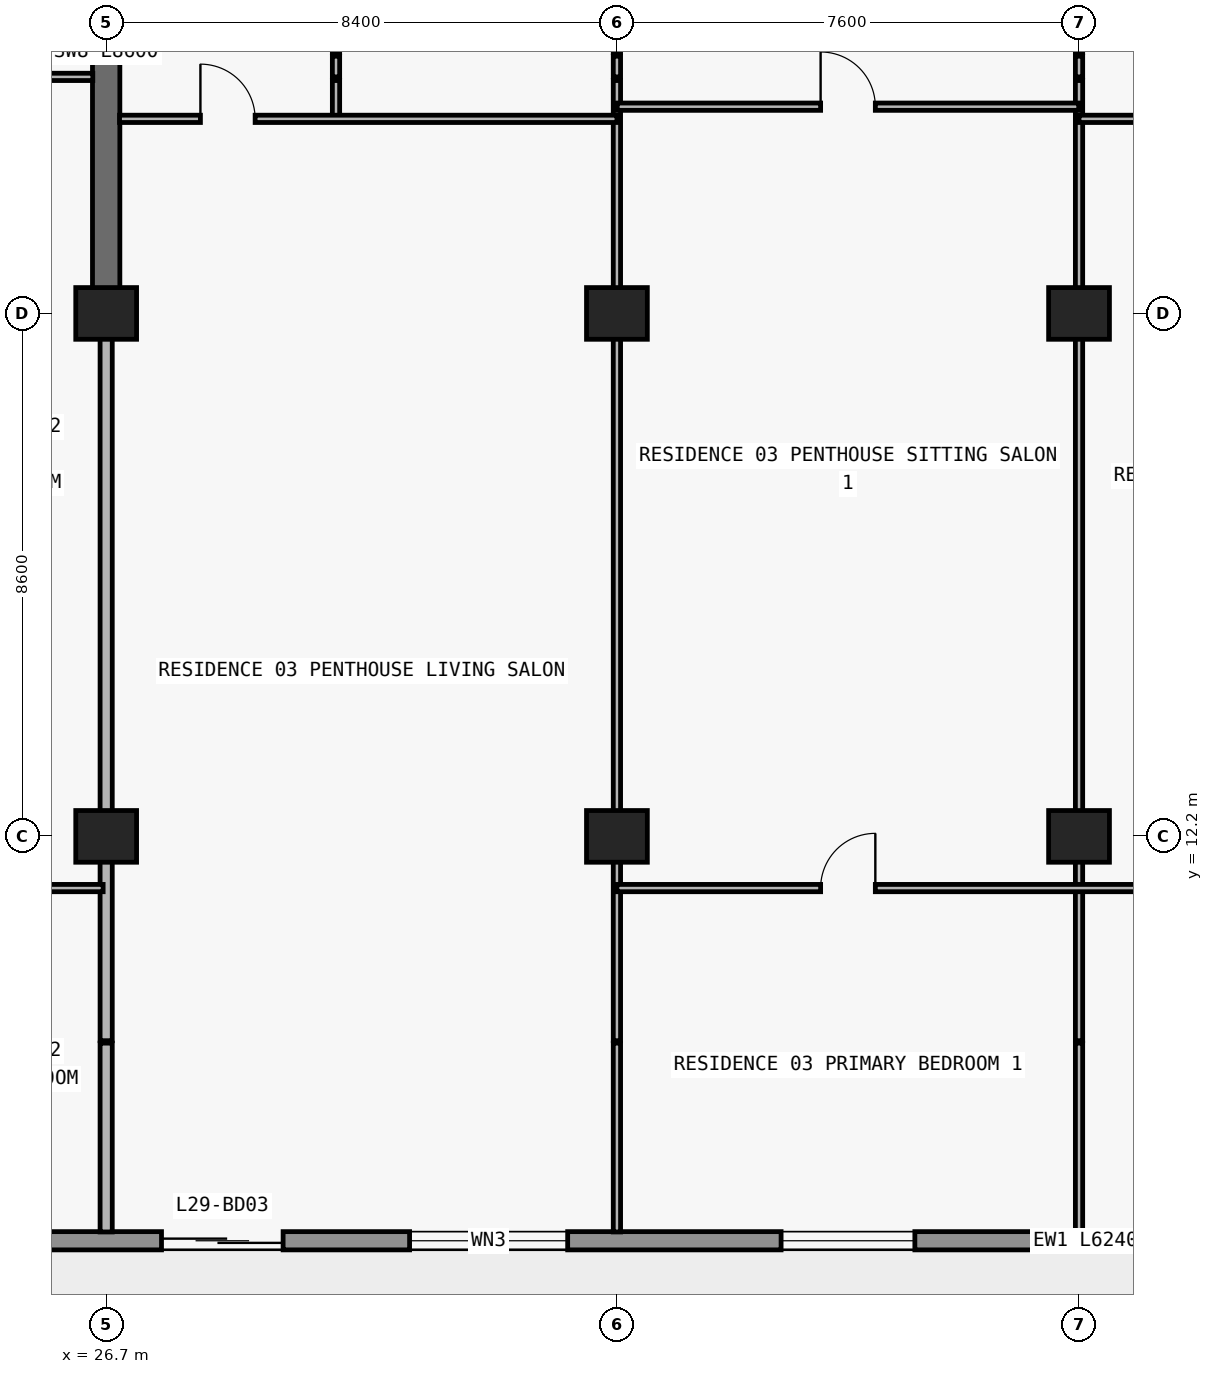
"""IFC4 building model, lengths in metres.
Left out: names, types, materials, properties, quantities, classifications, styles, units other than length and angle.
Written with IfcOpenShell. Run it as: python <this file> out.ifc"""

import sys

from ifc_helpers import new_model, si_unit, direction, frame, frame_2d, origin, origin_2d, place, context, subcontext, project, spatial, rectangle, extrude, element, fill, save


model = new_model("IFC4")
c1 = context("Model", 3, precision=1e-05, world=origin(), true_north=direction((0.0, 1.0)))
c2 = subcontext(c1, "Body", "Model", "MODEL_VIEW")
j1 = project(units=[si_unit("LENGTHUNIT", "METRE"), si_unit("PLANEANGLEUNIT", "RADIAN")], contexts=[c1])
p1 = place(None, origin())
s1 = spatial("IfcSite", under=j1, at=p1, CompositionType="ELEMENT")
p2 = place(p1, origin())
s2 = spatial("IfcBuilding", under=s1, at=p2, CompositionType="ELEMENT")
p3 = place(p2, frame((0.0, 0.0, 109.2)))
s3 = spatial("IfcBuildingStorey", under=s2, at=p3, CompositionType="ELEMENT", Elevation=109.2)
for number, where, z_axis, x_axis in (
    (1, (26.7, 12.2, 0.0), (0.0, 0.0, 1.0), (1.0, 0.0, 0.0)),
    (2, (35.1, 12.2, 0.0), (0.0, 0.0, 1.0), (1.0, 0.0, 0.0)),
    (3, (42.7, 12.2, 0.0), (0.0, 0.0, 1.0), (1.0, 0.0, 0.0)),
    (4, (26.7, 20.8, 0.0), (0.0, 0.0, 1.0), (1.0, 0.0, 0.0)),
    (5, (35.1, 20.8, 0.0), (0.0, 0.0, 1.0), (1.0, 0.0, 0.0)),
    (6, (42.7, 20.8, 0.0), (0.0, 0.0, 1.0), (1.0, 0.0, 0.0)),
):
    element("IfcColumn", number, at=place(p3, frame(where, z_axis=z_axis, x_axis=x_axis)), inside=s3, PredefinedType="COLUMN", context=c2, shape_type="SweptSolid", body=[
        extrude(rectangle(XDim=1.0, YDim=0.85, at=origin_2d()), origin(), (0.0, 0.0, 1.0), 3.05),
    ])
p4 = place(p3, frame((26.7, 20.8, 0.0), z_axis=(0.0, 0.0, 1.0), x_axis=(0.0, 1.0, 0.0)))
e7 = element("IfcWall", 7, at=p4, inside=s3, PredefinedType="SHEAR", context=c2, shape_type="SweptSolid", body=[
    extrude(rectangle(XDim=8.6, YDim=0.45, at=frame_2d((4.3, 0.0))), origin(), (0.0, 0.0, 1.0), 3.05),
])
p5 = place(p3, frame((70.1, 5.55, 0.0), z_axis=(0.0, 0.0, 1.0), x_axis=(-1.0, 0.0, 0.0)))
e8 = element("IfcWall", 8, at=p5, inside=s3, PredefinedType="STANDARD", context=c2, shape_type="SweptSolid", body=[
    extrude(rectangle(XDim=62.4, YDim=0.3, at=frame_2d((31.2, 0.0))), origin(), (0.0, 0.0, 1.0), 3.05),
])
p6 = place(p5, frame((57.226, 0.0, 0.0)))
e9 = element("IfcOpeningElement", 9, at=p6, cuts=e8, PredefinedType="OPENING", context=c2, shape_type="SweptSolid", body=[
    extrude(rectangle(XDim=2.0, YDim=2.3, at=frame_2d((1.0, 1.15))), frame((0.0, 0.16, 0.0), z_axis=(0.0, -1.0, 0.0), x_axis=(1.0, 0.0, 0.0)), (0.0, 0.0, 1.0), 0.32),
])
p7 = place(p5, frame((52.926, 0.0, 0.85)))
e10 = element("IfcOpeningElement", 10, at=p7, cuts=e8, PredefinedType="OPENING", context=c2, shape_type="SweptSolid", body=[
    extrude(rectangle(XDim=2.2, YDim=1.55, at=frame_2d((1.1, 0.775))), frame((0.0, 0.16, 0.0), z_axis=(0.0, -1.0, 0.0), x_axis=(1.0, 0.0, 0.0)), (0.0, 0.0, 1.0), 0.32),
])
p8 = place(p5, frame((48.49, 0.0, 0.0)))
e11 = element("IfcOpeningElement", 11, at=p8, cuts=e8, PredefinedType="OPENING", context=c2, shape_type="SweptSolid", body=[
    extrude(rectangle(XDim=2.0, YDim=2.3, at=frame_2d((1.0, 1.15))), frame((0.0, 0.16, 0.0), z_axis=(0.0, -1.0, 0.0), x_axis=(1.0, 0.0, 0.0)), (0.0, 0.0, 1.0), 0.32),
])
p9 = place(p5, frame((44.39, 0.0, 0.85)))
e12 = element("IfcOpeningElement", 12, at=p9, cuts=e8, PredefinedType="OPENING", context=c2, shape_type="SweptSolid", body=[
    extrude(rectangle(XDim=1.8, YDim=1.55, at=frame_2d((0.9, 0.775))), frame((0.0, 0.16, 0.0), z_axis=(0.0, -1.0, 0.0), x_axis=(1.0, 0.0, 0.0)), (0.0, 0.0, 1.0), 0.32),
])
p10 = place(p5, frame((40.49, 0.0, 0.0)))
e13 = element("IfcOpeningElement", 13, at=p10, cuts=e8, PredefinedType="OPENING", context=c2, shape_type="SweptSolid", body=[
    extrude(rectangle(XDim=2.0, YDim=2.3, at=frame_2d((1.0, 1.15))), frame((0.0, 0.16, 0.0), z_axis=(0.0, -1.0, 0.0), x_axis=(1.0, 0.0, 0.0)), (0.0, 0.0, 1.0), 0.32),
])
p11 = place(p5, frame((35.81, 0.0, 0.65)))
e14 = element("IfcOpeningElement", 14, at=p11, cuts=e8, PredefinedType="OPENING", context=c2, shape_type="SweptSolid", body=[
    extrude(rectangle(XDim=2.6, YDim=1.85, at=frame_2d((1.3, 0.925))), frame((0.0, 0.16, 0.0), z_axis=(0.0, -1.0, 0.0), x_axis=(1.0, 0.0, 0.0)), (0.0, 0.0, 1.0), 0.32),
])
p12 = place(p5, frame((30.1, 0.0, 0.85)))
e15 = element("IfcOpeningElement", 15, at=p12, cuts=e8, PredefinedType="OPENING", context=c2, shape_type="SweptSolid", body=[
    extrude(rectangle(XDim=2.2, YDim=1.55, at=frame_2d((1.1, 0.775))), frame((0.0, 0.16, 0.0), z_axis=(0.0, -1.0, 0.0), x_axis=(1.0, 0.0, 0.0)), (0.0, 0.0, 1.0), 0.32),
])
p13 = place(p5, frame((22.1, 0.0, 0.85)))
e16 = element("IfcOpeningElement", 16, at=p13, cuts=e8, PredefinedType="OPENING", context=c2, shape_type="SweptSolid", body=[
    extrude(rectangle(XDim=2.2, YDim=1.55, at=frame_2d((1.1, 0.775))), frame((0.0, 0.16, 0.0), z_axis=(0.0, -1.0, 0.0), x_axis=(1.0, 0.0, 0.0)), (0.0, 0.0, 1.0), 0.32),
])
p14 = place(p5, frame((15.69, 0.0, 0.0)))
e17 = element("IfcOpeningElement", 17, at=p14, cuts=e8, PredefinedType="OPENING", context=c2, shape_type="SweptSolid", body=[
    extrude(rectangle(XDim=2.0, YDim=2.3, at=frame_2d((1.0, 1.15))), frame((0.0, 0.16, 0.0), z_axis=(0.0, -1.0, 0.0), x_axis=(1.0, 0.0, 0.0)), (0.0, 0.0, 1.0), 0.32),
])
p15 = place(p5, frame((11.59, 0.0, 0.85)))
e18 = element("IfcOpeningElement", 18, at=p15, cuts=e8, PredefinedType="OPENING", context=c2, shape_type="SweptSolid", body=[
    extrude(rectangle(XDim=1.8, YDim=1.55, at=frame_2d((0.9, 0.775))), frame((0.0, 0.16, 0.0), z_axis=(0.0, -1.0, 0.0), x_axis=(1.0, 0.0, 0.0)), (0.0, 0.0, 1.0), 0.32),
])
p16 = place(p5, frame((7.626, 0.0, 0.0)))
e19 = element("IfcOpeningElement", 19, at=p16, cuts=e8, PredefinedType="OPENING", context=c2, shape_type="SweptSolid", body=[
    extrude(rectangle(XDim=2.0, YDim=2.3, at=frame_2d((1.0, 1.15))), frame((0.0, 0.16, 0.0), z_axis=(0.0, -1.0, 0.0), x_axis=(1.0, 0.0, 0.0)), (0.0, 0.0, 1.0), 0.32),
])
p17 = place(p5, frame((3.326, 0.0, 0.85)))
e20 = element("IfcOpeningElement", 20, at=p17, cuts=e8, PredefinedType="OPENING", context=c2, shape_type="SweptSolid", body=[
    extrude(rectangle(XDim=2.2, YDim=1.55, at=frame_2d((1.1, 0.775))), frame((0.0, 0.16, 0.0), z_axis=(0.0, -1.0, 0.0), x_axis=(1.0, 0.0, 0.0)), (0.0, 0.0, 1.0), 0.32),
])
p18 = place(p3, frame((26.7, 5.695, 0.0), z_axis=(0.0, 0.0, 1.0), x_axis=(0.0, 1.0, 0.0)))
e21 = element("IfcWall", 21, at=p18, inside=s3, PredefinedType="PARTITIONING", context=c2, shape_type="SweptSolid", body=[
    extrude(rectangle(XDim=3.105, YDim=0.2, at=frame_2d((1.552, 0.0))), origin(), (0.0, 0.0, 1.0), 3.05),
])
p19 = place(p3, frame((26.7, 8.84, 0.0), z_axis=(0.0, 0.0, 1.0), x_axis=(0.0, 1.0, 0.0)))
e22 = element("IfcWall", 22, at=p19, inside=s3, PredefinedType="PARTITIONING", context=c2, shape_type="SweptSolid", body=[
    extrude(rectangle(XDim=11.955, YDim=0.2, at=frame_2d((5.978, 0.0))), origin(), (0.0, 0.0, 1.0), 2.174),
])
p20 = place(p3, frame((30.48, 24.0, 0.0), z_axis=(0.0, 0.0, 1.0), x_axis=(0.0, 1.0, 0.0)))
e23 = element("IfcWall", 23, at=p20, inside=s3, PredefinedType="PARTITIONING", context=c2, shape_type="SweptSolid", body=[
    extrude(rectangle(XDim=0.63, YDim=0.12, at=frame_2d((0.315, 0.0))), origin(), (0.0, 0.0, 1.0), 3.05),
])
p21 = place(p3, frame((30.48, 24.69, 0.0), z_axis=(0.0, 0.0, 1.0), x_axis=(0.0, 1.0, 0.0)))
e24 = element("IfcWall", 24, at=p21, inside=s3, PredefinedType="PARTITIONING", context=c2, shape_type="SweptSolid", body=[
    extrude(rectangle(XDim=0.34, YDim=0.12, at=frame_2d((0.17, 0.0))), origin(), (0.0, 0.0, 1.0), 3.05),
])
p22 = place(p3, frame((35.1, 5.695, 0.0), z_axis=(0.0, 0.0, 1.0), x_axis=(0.0, 1.0, 0.0)))
e25 = element("IfcWall", 25, at=p22, inside=s3, PredefinedType="PARTITIONING", context=c2, shape_type="SweptSolid", body=[
    extrude(rectangle(XDim=3.105, YDim=0.12, at=frame_2d((1.552, 0.0))), origin(), (0.0, 0.0, 1.0), 3.05),
])
p23 = place(p3, frame((35.1, 8.84, 0.0), z_axis=(0.0, 0.0, 1.0), x_axis=(0.0, 1.0, 0.0)))
e26 = element("IfcWall", 26, at=p23, inside=s3, PredefinedType="PARTITIONING", context=c2, shape_type="SweptSolid", body=[
    extrude(rectangle(XDim=15.79, YDim=0.12, at=frame_2d((7.895, 0.0))), origin(), (0.0, 0.0, 1.0), 2.174),
])
p24 = place(p3, frame((35.1, 24.69, 0.0), z_axis=(0.0, 0.0, 1.0), x_axis=(0.0, 1.0, 0.0)))
e27 = element("IfcWall", 27, at=p24, inside=s3, PredefinedType="PARTITIONING", context=c2, shape_type="SweptSolid", body=[
    extrude(rectangle(XDim=0.34, YDim=0.12, at=frame_2d((0.17, 0.0))), origin(), (0.0, 0.0, 1.0), 2.174),
])
p25 = place(p3, frame((42.7, 5.695, 0.0), z_axis=(0.0, 0.0, 1.0), x_axis=(0.0, 1.0, 0.0)))
e28 = element("IfcWall", 28, at=p25, inside=s3, PredefinedType="PARTITIONING", context=c2, shape_type="SweptSolid", body=[
    extrude(rectangle(XDim=3.105, YDim=0.12, at=frame_2d((1.552, 0.0))), origin(), (0.0, 0.0, 1.0), 3.05),
])
p26 = place(p3, frame((42.7, 8.84, 0.0), z_axis=(0.0, 0.0, 1.0), x_axis=(0.0, 1.0, 0.0)))
e29 = element("IfcWall", 29, at=p26, inside=s3, PredefinedType="PARTITIONING", context=c2, shape_type="SweptSolid", body=[
    extrude(rectangle(XDim=15.79, YDim=0.12, at=frame_2d((7.895, 0.0))), origin(), (0.0, 0.0, 1.0), 2.174),
])
p27 = place(p3, frame((42.7, 24.69, 0.0), z_axis=(0.0, 0.0, 1.0), x_axis=(0.0, 1.0, 0.0)))
e30 = element("IfcWall", 30, at=p27, inside=s3, PredefinedType="PARTITIONING", context=c2, shape_type="SweptSolid", body=[
    extrude(rectangle(XDim=0.34, YDim=0.12, at=frame_2d((0.17, 0.0))), origin(), (0.0, 0.0, 1.0), 2.174),
])
p28 = place(p3, frame((22.92, 11.35, 0.0), z_axis=(0.0, 0.0, 1.0), x_axis=(1.0, 0.0, 0.0)))
e31 = element("IfcWall", 31, at=p28, inside=s3, PredefinedType="PARTITIONING", context=c2, shape_type="SweptSolid", body=[
    extrude(rectangle(XDim=3.73, YDim=0.12, at=frame_2d((1.865, 0.0))), origin(), (0.0, 0.0, 1.0), 3.05),
])
p29 = place(p28, frame((1.415, 0.0, 0.0)))
e32 = element("IfcOpeningElement", 32, at=p29, cuts=e31, PredefinedType="OPENING", context=c2, shape_type="SweptSolid", body=[
    extrude(rectangle(XDim=0.9, YDim=2.15, at=frame_2d((0.45, 1.075))), frame((0.0, 0.07, 0.0), z_axis=(0.0, -1.0, 0.0), x_axis=(1.0, 0.0, 0.0)), (0.0, 0.0, 1.0), 0.14),
])
p30 = place(p3, frame((35.1, 11.35, 0.0), z_axis=(0.0, 0.0, 1.0), x_axis=(1.0, 0.0, 0.0)))
e33 = element("IfcWall", 33, at=p30, inside=s3, PredefinedType="PARTITIONING", context=c2, shape_type="SweptSolid", body=[
    extrude(rectangle(XDim=16.0, YDim=0.12, at=frame_2d((8.0, 0.0))), origin(), (0.0, 0.0, 1.0), 3.05),
])
p31 = place(p30, frame((3.35, 0.0, 0.0)))
e34 = element("IfcOpeningElement", 34, at=p31, cuts=e33, PredefinedType="OPENING", context=c2, shape_type="SweptSolid", body=[
    extrude(rectangle(XDim=0.9, YDim=2.15, at=frame_2d((0.45, 1.075))), frame((0.0, 0.07, 0.0), z_axis=(0.0, -1.0, 0.0), x_axis=(1.0, 0.0, 0.0)), (0.0, 0.0, 1.0), 0.14),
])
p32 = place(p30, frame((11.35, 0.0, 0.0)))
e35 = element("IfcOpeningElement", 35, at=p32, cuts=e33, PredefinedType="OPENING", context=c2, shape_type="SweptSolid", body=[
    extrude(rectangle(XDim=0.9, YDim=2.15, at=frame_2d((0.45, 1.075))), frame((0.0, 0.07, 0.0), z_axis=(0.0, -1.0, 0.0), x_axis=(1.0, 0.0, 0.0)), (0.0, 0.0, 1.0), 0.14),
])
p33 = place(p3, frame((26.92, 24.0, 0.0), z_axis=(0.0, 0.0, 1.0), x_axis=(1.0, 0.0, 0.0)))
e36 = element("IfcWall", 36, at=p33, inside=s3, PredefinedType="PARTITIONING", context=c2, shape_type="SweptSolid", body=[
    extrude(rectangle(XDim=8.18, YDim=0.12, at=frame_2d((4.09, 0.0))), origin(), (0.0, 0.0, 1.0), 3.05),
])
p34 = place(p33, frame((1.33, 0.0, 0.0)))
e37 = element("IfcOpeningElement", 37, at=p34, cuts=e36, PredefinedType="OPENING", context=c2, shape_type="SweptSolid", body=[
    extrude(rectangle(XDim=0.9, YDim=2.15, at=frame_2d((0.45, 1.075))), frame((0.0, 0.07, 0.0), z_axis=(0.0, -1.0, 0.0), x_axis=(1.0, 0.0, 0.0)), (0.0, 0.0, 1.0), 0.14),
])
p35 = place(p3, frame((42.7, 24.0, 0.0), z_axis=(0.0, 0.0, 1.0), x_axis=(1.0, 0.0, 0.0)))
e38 = element("IfcWall", 38, at=p35, inside=s3, PredefinedType="PARTITIONING", context=c2, shape_type="SweptSolid", body=[
    extrude(rectangle(XDim=8.18, YDim=0.12, at=frame_2d((4.09, 0.0))), origin(), (0.0, 0.0, 1.0), 3.05),
])
p36 = place(p35, frame((3.64, 0.0, 0.0)))
e39 = element("IfcOpeningElement", 39, at=p36, cuts=e38, PredefinedType="OPENING", context=c2, shape_type="SweptSolid", body=[
    extrude(rectangle(XDim=0.9, YDim=2.15, at=frame_2d((0.45, 1.075))), frame((0.0, 0.07, 0.0), z_axis=(0.0, -1.0, 0.0), x_axis=(1.0, 0.0, 0.0)), (0.0, 0.0, 1.0), 0.14),
])
p37 = place(p3, frame((35.105, 24.2, 0.0), z_axis=(0.0, 0.0, 1.0), x_axis=(1.0, 0.0, 0.0)))
e40 = element("IfcWall", 40, at=p37, inside=s3, PredefinedType="PARTITIONING", context=c2, shape_type="SweptSolid", body=[
    extrude(rectangle(XDim=7.59, YDim=0.12, at=frame_2d((3.795, 0.0))), origin(), (0.0, 0.0, 1.0), 3.05),
])
p38 = place(p37, frame((3.345, 0.0, 0.0)))
e41 = element("IfcOpeningElement", 41, at=p38, cuts=e40, PredefinedType="OPENING", context=c2, shape_type="SweptSolid", body=[
    extrude(rectangle(XDim=0.9, YDim=2.15, at=frame_2d((0.45, 1.075))), frame((0.0, 0.07, 0.0), z_axis=(0.0, -1.0, 0.0), x_axis=(1.0, 0.0, 0.0)), (0.0, 0.0, 1.0), 0.14),
])
p39 = place(p3, frame((18.3, 24.69, 0.0), z_axis=(0.0, 0.0, 1.0), x_axis=(1.0, 0.0, 0.0)))
e42 = element("IfcWall", 42, at=p39, inside=s3, PredefinedType="PARTITIONING", context=c2, shape_type="SweptSolid", body=[
    extrude(rectangle(XDim=8.18, YDim=0.12, at=frame_2d((4.09, 0.0))), origin(), (0.0, 0.0, 1.0), 3.05),
])
p40 = place(p39, frame((1.818, 0.0, 0.0)))
e43 = element("IfcOpeningElement", 43, at=p40, cuts=e42, PredefinedType="OPENING", context=c2, shape_type="SweptSolid", body=[
    extrude(rectangle(XDim=0.9, YDim=2.15, at=frame_2d((0.45, 1.075))), frame((0.0, 0.07, 0.0), z_axis=(0.0, -1.0, 0.0), x_axis=(1.0, 0.0, 0.0)), (0.0, 0.0, 1.0), 0.14),
])
p41 = place(p39, frame((5.95, 0.0, 0.0)))
e44 = element("IfcOpeningElement", 44, at=p41, cuts=e42, PredefinedType="OPENING", context=c2, shape_type="SweptSolid", body=[
    extrude(rectangle(XDim=0.9, YDim=2.15, at=frame_2d((0.45, 1.075))), frame((0.0, 0.07, 0.0), z_axis=(0.0, -1.0, 0.0), x_axis=(1.0, 0.0, 0.0)), (0.0, 0.0, 1.0), 0.14),
])
p42 = place(p10, origin())
e45 = element("IfcDoor", 45, at=p42, inside=s3, OperationType="DOUBLE_DOOR_SLIDING", PredefinedType="DOOR", context=c2, shape_type="SweptSolid", body=[
    extrude(rectangle(XDim=2.0, YDim=2.3, at=frame_2d((1.0, 1.15))), frame((0.0, 0.025, 0.0), z_axis=(0.0, -1.0, 0.0), x_axis=(1.0, 0.0, 0.0)), (0.0, 0.0, 1.0), 0.05),
])
fill(e13, e45)
p43 = place(p11, origin())
e46 = element("IfcWindow", 46, at=p43, inside=s3, PartitioningType="SINGLE_PANEL", PredefinedType="WINDOW", context=c2, shape_type="SweptSolid", body=[
    extrude(rectangle(XDim=2.6, YDim=1.85, at=frame_2d((1.3, 0.925))), frame((0.0, 0.03, 0.0), z_axis=(0.0, -1.0, 0.0), x_axis=(1.0, 0.0, 0.0)), (0.0, 0.0, 1.0), 0.06),
])
fill(e14, e46)
p44 = place(p12, origin())
e47 = element("IfcWindow", 47, at=p44, inside=s3, PartitioningType="SINGLE_PANEL", PredefinedType="WINDOW", context=c2, shape_type="SweptSolid", body=[
    extrude(rectangle(XDim=2.2, YDim=1.55, at=frame_2d((1.1, 0.775))), frame((0.0, 0.03, 0.0), z_axis=(0.0, -1.0, 0.0), x_axis=(1.0, 0.0, 0.0)), (0.0, 0.0, 1.0), 0.06),
])
fill(e15, e47)
p45 = place(p34, origin())
e48 = element("IfcDoor", 48, at=p45, inside=s3, OperationType="SINGLE_SWING_LEFT", PredefinedType="DOOR", context=c2, shape_type="SweptSolid", body=[
    extrude(rectangle(XDim=0.9, YDim=2.15, at=frame_2d((0.45, 1.075))), frame((0.0, 0.025, 0.0), z_axis=(0.0, -1.0, 0.0), x_axis=(1.0, 0.0, 0.0)), (0.0, 0.0, 1.0), 0.05),
])
fill(e37, e48)
p46 = place(p38, origin())
e49 = element("IfcDoor", 49, at=p46, inside=s3, OperationType="SINGLE_SWING_LEFT", PredefinedType="DOOR", context=c2, shape_type="SweptSolid", body=[
    extrude(rectangle(XDim=0.9, YDim=2.15, at=frame_2d((0.45, 1.075))), frame((0.0, 0.025, 0.0), z_axis=(0.0, -1.0, 0.0), x_axis=(1.0, 0.0, 0.0)), (0.0, 0.0, 1.0), 0.05),
])
fill(e41, e49)
p47 = place(p31, origin())
e50 = element("IfcDoor", 50, at=p47, inside=s3, OperationType="SINGLE_SWING_RIGHT", PredefinedType="DOOR", context=c2, shape_type="SweptSolid", body=[
    extrude(rectangle(XDim=0.9, YDim=2.15, at=frame_2d((0.45, 1.075))), frame((0.0, 0.025, 0.0), z_axis=(0.0, -1.0, 0.0), x_axis=(1.0, 0.0, 0.0)), (0.0, 0.0, 1.0), 0.05),
])
fill(e34, e50)
save(model, sys.argv[1])
